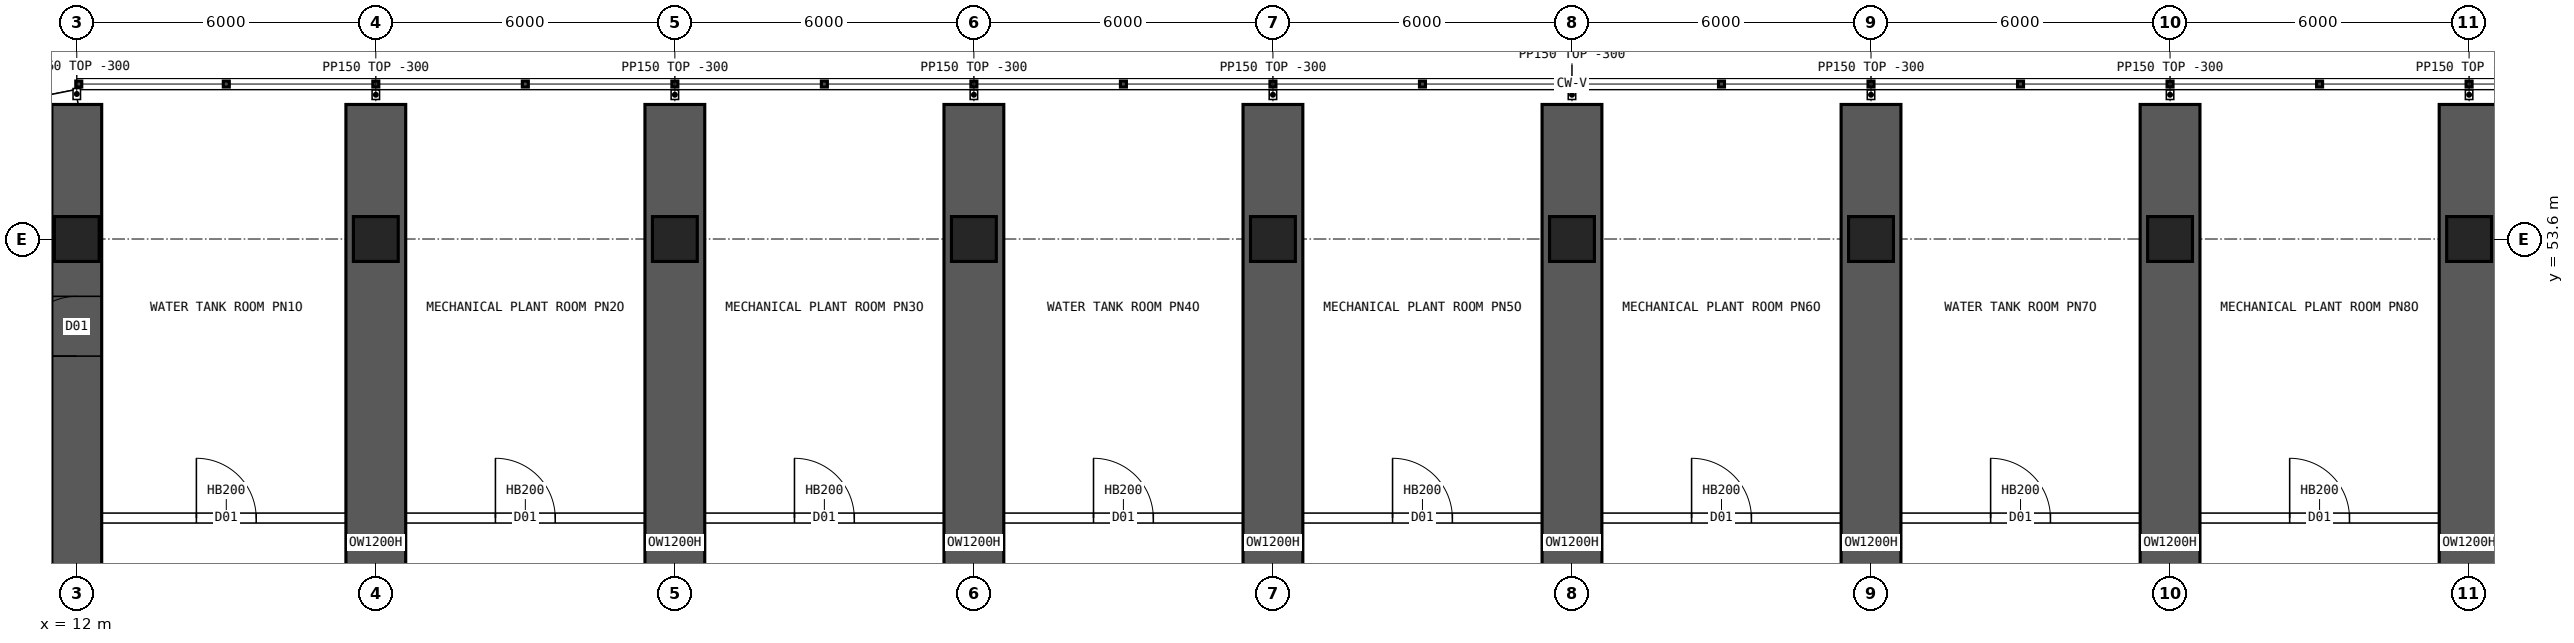
"""IFC4 building model, lengths in metres.
Left out: names, types, materials, properties, quantities, classifications, styles, units other than length and angle.
Written with IfcOpenShell. Run it as: python <this file> out.ifc"""

import sys

from ifc_helpers import new_model, si_unit, direction, frame, frame_2d, origin, origin_2d, place, context, subcontext, project, spatial, polyline, rectangle, hollow_rectangle, outline, extrude, element, fill, save


model = new_model("IFC4")
c1 = context("Model", 3, precision=1e-05, world=origin(), true_north=direction((0.0, 1.0)))
c2 = subcontext(c1, "Body", "Model", "MODEL_VIEW")
j1 = project(units=[si_unit("LENGTHUNIT", "METRE"), si_unit("PLANEANGLEUNIT", "RADIAN")], contexts=[c1])
p1 = place(None, origin())
s1 = spatial("IfcSite", under=j1, at=p1, CompositionType="ELEMENT")
p2 = place(p1, origin())
s2 = spatial("IfcBuilding", under=s1, at=p2, CompositionType="ELEMENT")
p3 = place(p2, frame((0.0, 0.0, 68.95)))
s3 = spatial("IfcBuildingStorey", under=s2, at=p3, CompositionType="ELEMENT", Elevation=68.95)
for number, where, z_axis, x_axis in (
    (1, (12.0, 53.6, 0.0), (0.0, 0.0, 1.0), (1.0, 0.0, 0.0)),
    (2, (18.0, 53.6, 0.0), (0.0, 0.0, 1.0), (1.0, 0.0, 0.0)),
    (3, (24.0, 53.6, 0.0), (0.0, 0.0, 1.0), (1.0, 0.0, 0.0)),
    (4, (30.0, 53.6, 0.0), (0.0, 0.0, 1.0), (1.0, 0.0, 0.0)),
    (5, (36.0, 53.6, 0.0), (0.0, 0.0, 1.0), (1.0, 0.0, 0.0)),
    (6, (42.0, 53.6, 0.0), (0.0, 0.0, 1.0), (1.0, 0.0, 0.0)),
    (7, (48.0, 53.6, 0.0), (0.0, 0.0, 1.0), (1.0, 0.0, 0.0)),
    (8, (54.0, 53.6, 0.0), (0.0, 0.0, 1.0), (1.0, 0.0, 0.0)),
    (9, (60.0, 53.6, 0.0), (0.0, 0.0, 1.0), (1.0, 0.0, 0.0)),
):
    element("IfcColumn", number, at=place(p3, frame(where, z_axis=z_axis, x_axis=x_axis)), inside=s3, PredefinedType="COLUMN", context=c2, shape_type="SweptSolid", body=[
        extrude(hollow_rectangle(XDim=0.9, YDim=0.9, WallThickness=0.09, at=origin_2d()), origin(), (0.0, 0.0, 1.0), 7.2),
    ])
p4 = place(p3, frame((12.0, 7.7, 0.0), z_axis=(0.0, 0.0, 1.0), x_axis=(0.0, 1.0, 0.0)))
e10 = element("IfcWall", 10, at=p4, inside=s3, PredefinedType="SHEAR", context=c2, shape_type="SweptSolid", body=[
    extrude(rectangle(XDim=48.6, YDim=1.0, at=frame_2d((24.3, 0.0))), origin(), (0.0, 0.0, 1.0), 7.2),
])
p5 = place(p4, frame((3.85, 0.0, 0.0)))
e11 = element("IfcOpeningElement", 11, at=p5, cuts=e10, PredefinedType="OPENING", context=c2, shape_type="SweptSolid", body=[
    extrude(rectangle(XDim=1.2, YDim=2.1, at=frame_2d((0.6, 1.05))), frame((0.0, 0.51, 0.0), z_axis=(0.0, -1.0, 0.0), x_axis=(1.0, 0.0, 0.0)), (0.0, 0.0, 1.0), 1.02),
])
p6 = place(p4, frame((11.35, 0.0, 0.0)))
e12 = element("IfcOpeningElement", 12, at=p6, cuts=e10, PredefinedType="OPENING", context=c2, shape_type="SweptSolid", body=[
    extrude(rectangle(XDim=1.2, YDim=2.1, at=frame_2d((0.6, 1.05))), frame((0.0, 0.51, 0.0), z_axis=(0.0, -1.0, 0.0), x_axis=(1.0, 0.0, 0.0)), (0.0, 0.0, 1.0), 1.02),
])
p7 = place(p4, frame((43.55, 0.0, 0.0)))
e13 = element("IfcOpeningElement", 13, at=p7, cuts=e10, PredefinedType="OPENING", context=c2, shape_type="SweptSolid", body=[
    extrude(rectangle(XDim=1.2, YDim=2.1, at=frame_2d((0.6, 1.05))), frame((0.0, 0.51, 0.0), z_axis=(0.0, -1.0, 0.0), x_axis=(1.0, 0.0, 0.0)), (0.0, 0.0, 1.0), 1.02),
])
p8 = place(p4, frame((36.05, 0.0, 0.0)))
e14 = element("IfcOpeningElement", 14, at=p8, cuts=e10, PredefinedType="OPENING", context=c2, shape_type="SweptSolid", body=[
    extrude(rectangle(XDim=1.2, YDim=2.1, at=frame_2d((0.6, 1.05))), frame((0.0, 0.51, 0.0), z_axis=(0.0, -1.0, 0.0), x_axis=(1.0, 0.0, 0.0)), (0.0, 0.0, 1.0), 1.02),
])
p9 = place(p3, frame((18.0, 38.7, 0.0), z_axis=(0.0, 0.0, 1.0), x_axis=(0.0, 1.0, 0.0)))
e15 = element("IfcWall", 15, at=p9, inside=s3, PredefinedType="SHEAR", context=c2, shape_type="SweptSolid", body=[
    extrude(rectangle(XDim=17.6, YDim=1.2, at=frame_2d((8.8, 0.0))), origin(), (0.0, 0.0, 1.0), 7.2),
])
p10 = place(p9, frame((0.3, 0.0, 0.0)))
e16 = element("IfcOpeningElement", 16, at=p10, cuts=e15, PredefinedType="OPENING", context=c2, shape_type="SweptSolid", body=[
    extrude(rectangle(XDim=1.2, YDim=2.1, at=frame_2d((0.6, 1.05))), frame((0.0, 0.61, 0.0), z_axis=(0.0, -1.0, 0.0), x_axis=(1.0, 0.0, 0.0)), (0.0, 0.0, 1.0), 1.22),
])
p11 = place(p3, frame((24.0, 38.7, 0.0), z_axis=(0.0, 0.0, 1.0), x_axis=(0.0, 1.0, 0.0)))
e17 = element("IfcWall", 17, at=p11, inside=s3, PredefinedType="SHEAR", context=c2, shape_type="SweptSolid", body=[
    extrude(rectangle(XDim=17.6, YDim=1.2, at=frame_2d((8.8, 0.0))), origin(), (0.0, 0.0, 1.0), 7.2),
])
p12 = place(p11, frame((0.3, 0.0, 0.0)))
e18 = element("IfcOpeningElement", 18, at=p12, cuts=e17, PredefinedType="OPENING", context=c2, shape_type="SweptSolid", body=[
    extrude(rectangle(XDim=1.2, YDim=2.1, at=frame_2d((0.6, 1.05))), frame((0.0, 0.61, 0.0), z_axis=(0.0, -1.0, 0.0), x_axis=(1.0, 0.0, 0.0)), (0.0, 0.0, 1.0), 1.22),
])
p13 = place(p3, frame((30.0, 38.7, 0.0), z_axis=(0.0, 0.0, 1.0), x_axis=(0.0, 1.0, 0.0)))
e19 = element("IfcWall", 19, at=p13, inside=s3, PredefinedType="SHEAR", context=c2, shape_type="SweptSolid", body=[
    extrude(rectangle(XDim=17.6, YDim=1.2, at=frame_2d((8.8, 0.0))), origin(), (0.0, 0.0, 1.0), 7.2),
])
p14 = place(p13, frame((0.3, 0.0, 0.0)))
e20 = element("IfcOpeningElement", 20, at=p14, cuts=e19, PredefinedType="OPENING", context=c2, shape_type="SweptSolid", body=[
    extrude(rectangle(XDim=1.2, YDim=2.1, at=frame_2d((0.6, 1.05))), frame((0.0, 0.61, 0.0), z_axis=(0.0, -1.0, 0.0), x_axis=(1.0, 0.0, 0.0)), (0.0, 0.0, 1.0), 1.22),
])
p15 = place(p3, frame((36.0, 38.7, 0.0), z_axis=(0.0, 0.0, 1.0), x_axis=(0.0, 1.0, 0.0)))
e21 = element("IfcWall", 21, at=p15, inside=s3, PredefinedType="SHEAR", context=c2, shape_type="SweptSolid", body=[
    extrude(rectangle(XDim=17.6, YDim=1.2, at=frame_2d((8.8, 0.0))), origin(), (0.0, 0.0, 1.0), 7.2),
])
p16 = place(p15, frame((0.3, 0.0, 0.0)))
e22 = element("IfcOpeningElement", 22, at=p16, cuts=e21, PredefinedType="OPENING", context=c2, shape_type="SweptSolid", body=[
    extrude(rectangle(XDim=1.2, YDim=2.1, at=frame_2d((0.6, 1.05))), frame((0.0, 0.61, 0.0), z_axis=(0.0, -1.0, 0.0), x_axis=(1.0, 0.0, 0.0)), (0.0, 0.0, 1.0), 1.22),
])
p17 = place(p3, frame((42.0, 38.7, 0.0), z_axis=(0.0, 0.0, 1.0), x_axis=(0.0, 1.0, 0.0)))
e23 = element("IfcWall", 23, at=p17, inside=s3, PredefinedType="SHEAR", context=c2, shape_type="SweptSolid", body=[
    extrude(rectangle(XDim=17.6, YDim=1.2, at=frame_2d((8.8, 0.0))), origin(), (0.0, 0.0, 1.0), 7.2),
])
p18 = place(p17, frame((0.3, 0.0, 0.0)))
e24 = element("IfcOpeningElement", 24, at=p18, cuts=e23, PredefinedType="OPENING", context=c2, shape_type="SweptSolid", body=[
    extrude(rectangle(XDim=1.2, YDim=2.1, at=frame_2d((0.6, 1.05))), frame((0.0, 0.61, 0.0), z_axis=(0.0, -1.0, 0.0), x_axis=(1.0, 0.0, 0.0)), (0.0, 0.0, 1.0), 1.22),
])
p19 = place(p3, frame((48.0, 38.7, 0.0), z_axis=(0.0, 0.0, 1.0), x_axis=(0.0, 1.0, 0.0)))
e25 = element("IfcWall", 25, at=p19, inside=s3, PredefinedType="SHEAR", context=c2, shape_type="SweptSolid", body=[
    extrude(rectangle(XDim=17.6, YDim=1.2, at=frame_2d((8.8, 0.0))), origin(), (0.0, 0.0, 1.0), 7.2),
])
p20 = place(p19, frame((0.3, 0.0, 0.0)))
e26 = element("IfcOpeningElement", 26, at=p20, cuts=e25, PredefinedType="OPENING", context=c2, shape_type="SweptSolid", body=[
    extrude(rectangle(XDim=1.2, YDim=2.1, at=frame_2d((0.6, 1.05))), frame((0.0, 0.61, 0.0), z_axis=(0.0, -1.0, 0.0), x_axis=(1.0, 0.0, 0.0)), (0.0, 0.0, 1.0), 1.22),
])
p21 = place(p3, frame((54.0, 38.7, 0.0), z_axis=(0.0, 0.0, 1.0), x_axis=(0.0, 1.0, 0.0)))
e27 = element("IfcWall", 27, at=p21, inside=s3, PredefinedType="SHEAR", context=c2, shape_type="SweptSolid", body=[
    extrude(rectangle(XDim=17.6, YDim=1.2, at=frame_2d((8.8, 0.0))), origin(), (0.0, 0.0, 1.0), 7.2),
])
p22 = place(p21, frame((0.3, 0.0, 0.0)))
e28 = element("IfcOpeningElement", 28, at=p22, cuts=e27, PredefinedType="OPENING", context=c2, shape_type="SweptSolid", body=[
    extrude(rectangle(XDim=1.2, YDim=2.1, at=frame_2d((0.6, 1.05))), frame((0.0, 0.61, 0.0), z_axis=(0.0, -1.0, 0.0), x_axis=(1.0, 0.0, 0.0)), (0.0, 0.0, 1.0), 1.22),
])
p23 = place(p3, frame((60.0, 38.7, 0.0), z_axis=(0.0, 0.0, 1.0), x_axis=(0.0, 1.0, 0.0)))
e29 = element("IfcWall", 29, at=p23, inside=s3, PredefinedType="SHEAR", context=c2, shape_type="SweptSolid", body=[
    extrude(rectangle(XDim=17.6, YDim=1.2, at=frame_2d((8.8, 0.0))), origin(), (0.0, 0.0, 1.0), 7.2),
])
p24 = place(p23, frame((0.3, 0.0, 0.0)))
e30 = element("IfcOpeningElement", 30, at=p24, cuts=e29, PredefinedType="OPENING", context=c2, shape_type="SweptSolid", body=[
    extrude(rectangle(XDim=1.2, YDim=2.1, at=frame_2d((0.6, 1.05))), frame((0.0, 0.61, 0.0), z_axis=(0.0, -1.0, 0.0), x_axis=(1.0, 0.0, 0.0)), (0.0, 0.0, 1.0), 1.22),
])
p25 = place(p3, frame((12.0, 56.45, 0.0), z_axis=(0.0, 0.0, 1.0), x_axis=(-0.980787251524, -0.195080412259, 0.0)))
e31 = element("IfcWall", 31, at=p25, inside=s3, PredefinedType="SOLIDWALL", context=c2, shape_type="SweptSolid", body=[
    extrude(outline(polyline([(-0.03, -0.15), (3.249, -0.15), (3.189, 0.15), (0.03, 0.15), (-0.03, -0.15)])), origin(), (0.0, 0.0, 1.0), 6.9),
])
p26 = place(p3, frame((12.5, 48.0, 0.0), z_axis=(0.0, 0.0, 1.0), x_axis=(1.0, 0.0, 0.0)))
e32 = element("IfcWall", 32, at=p26, inside=s3, PredefinedType="SOLIDWALL", context=c2, shape_type="SweptSolid", body=[
    extrude(rectangle(XDim=5.0, YDim=0.2, at=frame_2d((2.5, 0.0))), origin(), (0.0, 0.0, 1.0), 6.9),
])
p27 = place(p26, frame((1.9, 0.0, 0.0)))
e33 = element("IfcOpeningElement", 33, at=p27, cuts=e32, PredefinedType="OPENING", context=c2, shape_type="SweptSolid", body=[
    extrude(rectangle(XDim=1.2, YDim=2.1, at=frame_2d((0.6, 1.05))), frame((0.0, 0.11, 0.0), z_axis=(0.0, -1.0, 0.0), x_axis=(1.0, 0.0, 0.0)), (0.0, 0.0, 1.0), 0.22),
])
p28 = place(p3, frame((18.5, 48.0, 0.0), z_axis=(0.0, 0.0, 1.0), x_axis=(1.0, 0.0, 0.0)))
e34 = element("IfcWall", 34, at=p28, inside=s3, PredefinedType="SOLIDWALL", context=c2, shape_type="SweptSolid", body=[
    extrude(rectangle(XDim=5.0, YDim=0.2, at=frame_2d((2.5, 0.0))), origin(), (0.0, 0.0, 1.0), 6.9),
])
p29 = place(p28, frame((1.9, 0.0, 0.0)))
e35 = element("IfcOpeningElement", 35, at=p29, cuts=e34, PredefinedType="OPENING", context=c2, shape_type="SweptSolid", body=[
    extrude(rectangle(XDim=1.2, YDim=2.1, at=frame_2d((0.6, 1.05))), frame((0.0, 0.11, 0.0), z_axis=(0.0, -1.0, 0.0), x_axis=(1.0, 0.0, 0.0)), (0.0, 0.0, 1.0), 0.22),
])
p30 = place(p3, frame((24.5, 48.0, 0.0), z_axis=(0.0, 0.0, 1.0), x_axis=(1.0, 0.0, 0.0)))
e36 = element("IfcWall", 36, at=p30, inside=s3, PredefinedType="SOLIDWALL", context=c2, shape_type="SweptSolid", body=[
    extrude(rectangle(XDim=5.0, YDim=0.2, at=frame_2d((2.5, 0.0))), origin(), (0.0, 0.0, 1.0), 6.9),
])
p31 = place(p30, frame((1.9, 0.0, 0.0)))
e37 = element("IfcOpeningElement", 37, at=p31, cuts=e36, PredefinedType="OPENING", context=c2, shape_type="SweptSolid", body=[
    extrude(rectangle(XDim=1.2, YDim=2.1, at=frame_2d((0.6, 1.05))), frame((0.0, 0.11, 0.0), z_axis=(0.0, -1.0, 0.0), x_axis=(1.0, 0.0, 0.0)), (0.0, 0.0, 1.0), 0.22),
])
p32 = place(p3, frame((30.5, 48.0, 0.0), z_axis=(0.0, 0.0, 1.0), x_axis=(1.0, 0.0, 0.0)))
e38 = element("IfcWall", 38, at=p32, inside=s3, PredefinedType="SOLIDWALL", context=c2, shape_type="SweptSolid", body=[
    extrude(rectangle(XDim=5.0, YDim=0.2, at=frame_2d((2.5, 0.0))), origin(), (0.0, 0.0, 1.0), 6.9),
])
p33 = place(p32, frame((1.9, 0.0, 0.0)))
e39 = element("IfcOpeningElement", 39, at=p33, cuts=e38, PredefinedType="OPENING", context=c2, shape_type="SweptSolid", body=[
    extrude(rectangle(XDim=1.2, YDim=2.1, at=frame_2d((0.6, 1.05))), frame((0.0, 0.11, 0.0), z_axis=(0.0, -1.0, 0.0), x_axis=(1.0, 0.0, 0.0)), (0.0, 0.0, 1.0), 0.22),
])
p34 = place(p3, frame((36.5, 48.0, 0.0), z_axis=(0.0, 0.0, 1.0), x_axis=(1.0, 0.0, 0.0)))
e40 = element("IfcWall", 40, at=p34, inside=s3, PredefinedType="SOLIDWALL", context=c2, shape_type="SweptSolid", body=[
    extrude(rectangle(XDim=5.0, YDim=0.2, at=frame_2d((2.5, 0.0))), origin(), (0.0, 0.0, 1.0), 6.9),
])
p35 = place(p34, frame((1.9, 0.0, 0.0)))
e41 = element("IfcOpeningElement", 41, at=p35, cuts=e40, PredefinedType="OPENING", context=c2, shape_type="SweptSolid", body=[
    extrude(rectangle(XDim=1.2, YDim=2.1, at=frame_2d((0.6, 1.05))), frame((0.0, 0.11, 0.0), z_axis=(0.0, -1.0, 0.0), x_axis=(1.0, 0.0, 0.0)), (0.0, 0.0, 1.0), 0.22),
])
p36 = place(p3, frame((42.5, 48.0, 0.0), z_axis=(0.0, 0.0, 1.0), x_axis=(1.0, 0.0, 0.0)))
e42 = element("IfcWall", 42, at=p36, inside=s3, PredefinedType="SOLIDWALL", context=c2, shape_type="SweptSolid", body=[
    extrude(rectangle(XDim=5.0, YDim=0.2, at=frame_2d((2.5, 0.0))), origin(), (0.0, 0.0, 1.0), 6.9),
])
p37 = place(p36, frame((1.9, 0.0, 0.0)))
e43 = element("IfcOpeningElement", 43, at=p37, cuts=e42, PredefinedType="OPENING", context=c2, shape_type="SweptSolid", body=[
    extrude(rectangle(XDim=1.2, YDim=2.1, at=frame_2d((0.6, 1.05))), frame((0.0, 0.11, 0.0), z_axis=(0.0, -1.0, 0.0), x_axis=(1.0, 0.0, 0.0)), (0.0, 0.0, 1.0), 0.22),
])
p38 = place(p3, frame((48.5, 48.0, 0.0), z_axis=(0.0, 0.0, 1.0), x_axis=(1.0, 0.0, 0.0)))
e44 = element("IfcWall", 44, at=p38, inside=s3, PredefinedType="SOLIDWALL", context=c2, shape_type="SweptSolid", body=[
    extrude(rectangle(XDim=5.0, YDim=0.2, at=frame_2d((2.5, 0.0))), origin(), (0.0, 0.0, 1.0), 6.9),
])
p39 = place(p38, frame((1.9, 0.0, 0.0)))
e45 = element("IfcOpeningElement", 45, at=p39, cuts=e44, PredefinedType="OPENING", context=c2, shape_type="SweptSolid", body=[
    extrude(rectangle(XDim=1.2, YDim=2.1, at=frame_2d((0.6, 1.05))), frame((0.0, 0.11, 0.0), z_axis=(0.0, -1.0, 0.0), x_axis=(1.0, 0.0, 0.0)), (0.0, 0.0, 1.0), 0.22),
])
p40 = place(p3, frame((54.5, 48.0, 0.0), z_axis=(0.0, 0.0, 1.0), x_axis=(1.0, 0.0, 0.0)))
e46 = element("IfcWall", 46, at=p40, inside=s3, PredefinedType="SOLIDWALL", context=c2, shape_type="SweptSolid", body=[
    extrude(rectangle(XDim=5.0, YDim=0.2, at=frame_2d((2.5, 0.0))), origin(), (0.0, 0.0, 1.0), 6.9),
])
p41 = place(p40, frame((1.9, 0.0, 0.0)))
e47 = element("IfcOpeningElement", 47, at=p41, cuts=e46, PredefinedType="OPENING", context=c2, shape_type="SweptSolid", body=[
    extrude(rectangle(XDim=1.2, YDim=2.1, at=frame_2d((0.6, 1.05))), frame((0.0, 0.11, 0.0), z_axis=(0.0, -1.0, 0.0), x_axis=(1.0, 0.0, 0.0)), (0.0, 0.0, 1.0), 0.22),
])
p42 = place(p3, frame((12.0, 56.4, 0.0), z_axis=(0.0, 0.0, 1.0), x_axis=(0.0, 1.0, 0.0)))
e48 = element("IfcWall", 48, at=p42, inside=s3, PredefinedType="PARTITIONING", context=c2, shape_type="SweptSolid", body=[
    extrude(rectangle(XDim=0.22, YDim=0.15, at=frame_2d((0.11, 0.0))), origin(), (0.0, 0.0, 1.0), 6.9),
])
for number, where, z_axis, x_axis in (
    (49, (18.0, 56.4, 0.0), (0.0, 0.0, 1.0), (0.0, 1.0, 0.0)),
    (50, (24.0, 56.4, 0.0), (0.0, 0.0, 1.0), (0.0, 1.0, 0.0)),
    (51, (30.0, 56.4, 0.0), (0.0, 0.0, 1.0), (0.0, 1.0, 0.0)),
    (52, (36.0, 56.4, 0.0), (0.0, 0.0, 1.0), (0.0, 1.0, 0.0)),
    (53, (42.0, 56.4, 0.0), (0.0, 0.0, 1.0), (0.0, 1.0, 0.0)),
    (54, (48.0, 56.4, 0.0), (0.0, 0.0, 1.0), (0.0, 1.0, 0.0)),
    (55, (54.0, 56.4, 0.0), (0.0, 0.0, 1.0), (0.0, 1.0, 0.0)),
    (56, (60.0, 56.4, 0.0), (0.0, 0.0, 1.0), (0.0, 1.0, 0.0)),
):
    element("IfcWall", number, at=place(p3, frame(where, z_axis=z_axis, x_axis=x_axis)), inside=s3, PredefinedType="PARTITIONING", context=c2, shape_type="SweptSolid", body=[
        extrude(rectangle(XDim=0.19, YDim=0.15, at=frame_2d((0.095, 0.0))), origin(), (0.0, 0.0, 1.0), 6.9),
    ])
p43 = place(p27, origin())
e57 = element("IfcDoor", 57, at=p43, inside=s3, OperationType="SINGLE_SWING_LEFT", PredefinedType="DOOR", context=c2, shape_type="SweptSolid", body=[
    extrude(rectangle(XDim=1.2, YDim=2.1, at=frame_2d((0.6, 1.05))), frame((0.0, 0.025, 0.0), z_axis=(0.0, -1.0, 0.0), x_axis=(1.0, 0.0, 0.0)), (0.0, 0.0, 1.0), 0.05),
])
fill(e33, e57)
p44 = place(p29, origin())
e58 = element("IfcDoor", 58, at=p44, inside=s3, OperationType="SINGLE_SWING_LEFT", PredefinedType="DOOR", context=c2, shape_type="SweptSolid", body=[
    extrude(rectangle(XDim=1.2, YDim=2.1, at=frame_2d((0.6, 1.05))), frame((0.0, 0.025, 0.0), z_axis=(0.0, -1.0, 0.0), x_axis=(1.0, 0.0, 0.0)), (0.0, 0.0, 1.0), 0.05),
])
fill(e35, e58)
p45 = place(p31, origin())
e59 = element("IfcDoor", 59, at=p45, inside=s3, OperationType="SINGLE_SWING_LEFT", PredefinedType="DOOR", context=c2, shape_type="SweptSolid", body=[
    extrude(rectangle(XDim=1.2, YDim=2.1, at=frame_2d((0.6, 1.05))), frame((0.0, 0.025, 0.0), z_axis=(0.0, -1.0, 0.0), x_axis=(1.0, 0.0, 0.0)), (0.0, 0.0, 1.0), 0.05),
])
fill(e37, e59)
p46 = place(p33, origin())
e60 = element("IfcDoor", 60, at=p46, inside=s3, OperationType="SINGLE_SWING_LEFT", PredefinedType="DOOR", context=c2, shape_type="SweptSolid", body=[
    extrude(rectangle(XDim=1.2, YDim=2.1, at=frame_2d((0.6, 1.05))), frame((0.0, 0.025, 0.0), z_axis=(0.0, -1.0, 0.0), x_axis=(1.0, 0.0, 0.0)), (0.0, 0.0, 1.0), 0.05),
])
fill(e39, e60)
p47 = place(p35, origin())
e61 = element("IfcDoor", 61, at=p47, inside=s3, OperationType="SINGLE_SWING_LEFT", PredefinedType="DOOR", context=c2, shape_type="SweptSolid", body=[
    extrude(rectangle(XDim=1.2, YDim=2.1, at=frame_2d((0.6, 1.05))), frame((0.0, 0.025, 0.0), z_axis=(0.0, -1.0, 0.0), x_axis=(1.0, 0.0, 0.0)), (0.0, 0.0, 1.0), 0.05),
])
fill(e41, e61)
p48 = place(p37, origin())
e62 = element("IfcDoor", 62, at=p48, inside=s3, OperationType="SINGLE_SWING_LEFT", PredefinedType="DOOR", context=c2, shape_type="SweptSolid", body=[
    extrude(rectangle(XDim=1.2, YDim=2.1, at=frame_2d((0.6, 1.05))), frame((0.0, 0.025, 0.0), z_axis=(0.0, -1.0, 0.0), x_axis=(1.0, 0.0, 0.0)), (0.0, 0.0, 1.0), 0.05),
])
fill(e43, e62)
p49 = place(p39, origin())
e63 = element("IfcDoor", 63, at=p49, inside=s3, OperationType="SINGLE_SWING_LEFT", PredefinedType="DOOR", context=c2, shape_type="SweptSolid", body=[
    extrude(rectangle(XDim=1.2, YDim=2.1, at=frame_2d((0.6, 1.05))), frame((0.0, 0.025, 0.0), z_axis=(0.0, -1.0, 0.0), x_axis=(1.0, 0.0, 0.0)), (0.0, 0.0, 1.0), 0.05),
])
fill(e45, e63)
p50 = place(p41, origin())
e64 = element("IfcDoor", 64, at=p50, inside=s3, OperationType="SINGLE_SWING_LEFT", PredefinedType="DOOR", context=c2, shape_type="SweptSolid", body=[
    extrude(rectangle(XDim=1.2, YDim=2.1, at=frame_2d((0.6, 1.05))), frame((0.0, 0.025, 0.0), z_axis=(0.0, -1.0, 0.0), x_axis=(1.0, 0.0, 0.0)), (0.0, 0.0, 1.0), 0.05),
])
fill(e47, e64)
p51 = place(p7, origin())
e65 = element("IfcDoor", 65, at=p51, inside=s3, OperationType="SINGLE_SWING_LEFT", PredefinedType="DOOR", context=c2, shape_type="SweptSolid", body=[
    extrude(rectangle(XDim=1.2, YDim=2.1, at=frame_2d((0.6, 1.05))), frame((0.0, 0.485, 0.0), z_axis=(0.0, -1.0, 0.0), x_axis=(1.0, 0.0, 0.0)), (0.0, 0.0, 1.0), 0.05),
])
fill(e13, e65)
save(model, sys.argv[1])
